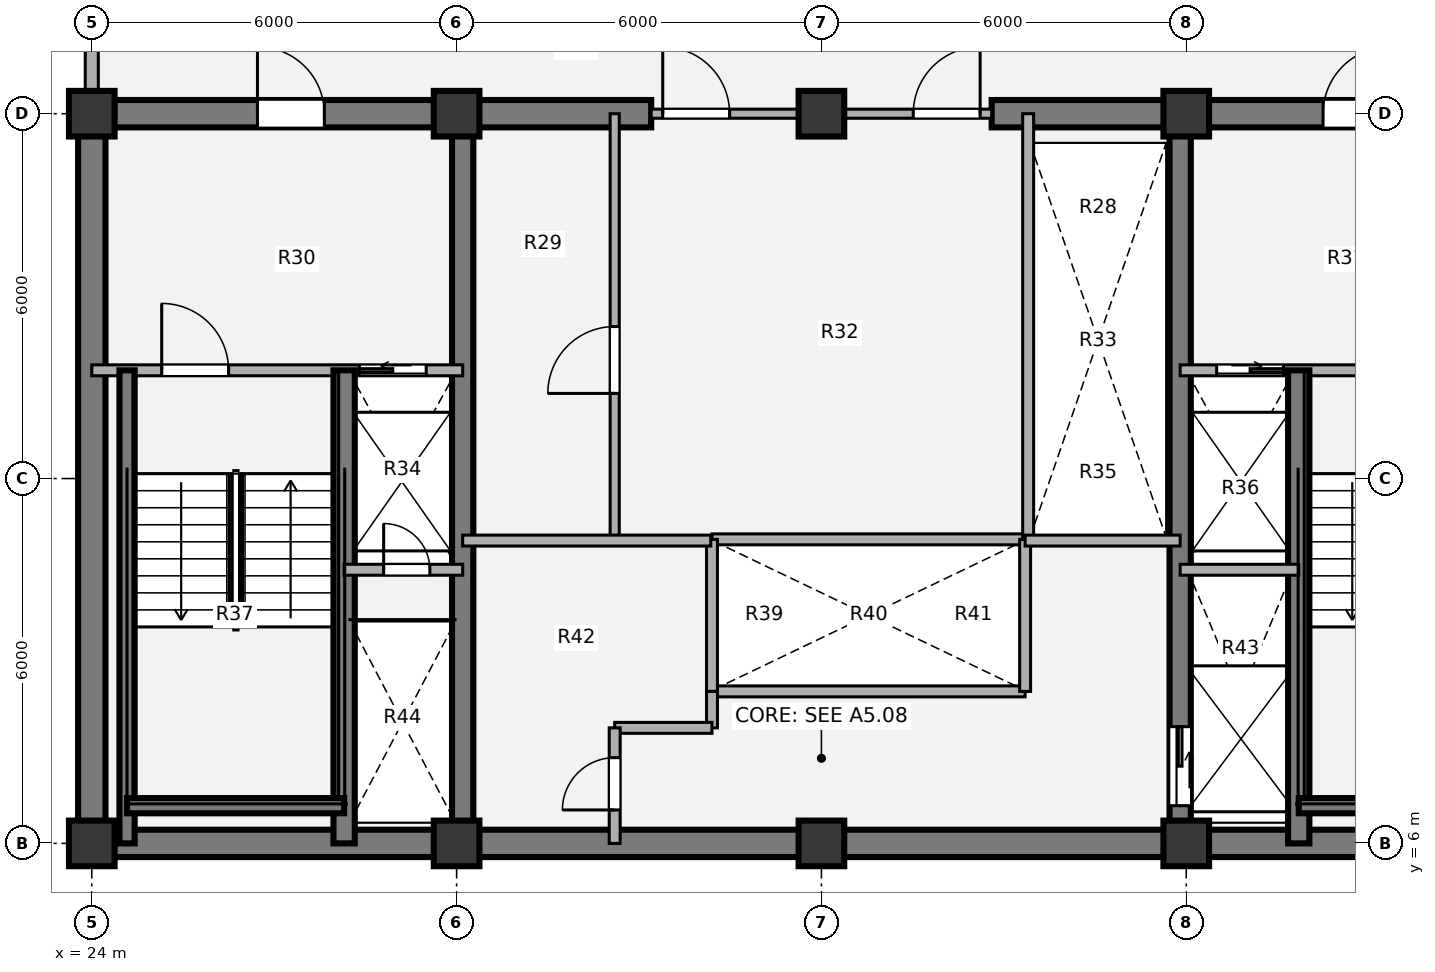
"""IFC4 building model, lengths in metres.
Left out: names, types, materials, properties, quantities, classifications, styles, units other than length and angle.
Written with IfcOpenShell. Run it as: python <this file> out.ifc"""

import sys

from ifc_helpers import new_model, si_unit, direction, frame, frame_2d, origin, origin_2d, place, context, subcontext, project, spatial, rectangle, extrude, source, transform, mapped, element, fill, save


model = new_model("IFC4")
c1 = context("Model", 3, precision=1e-05, world=origin(), true_north=direction((0.0, 1.0)))
c2 = subcontext(c1, "Body", "Model", "MODEL_VIEW")
j1 = project(units=[si_unit("LENGTHUNIT", "METRE"), si_unit("PLANEANGLEUNIT", "RADIAN")], contexts=[c1])
p1 = place(None, origin())
s1 = spatial("IfcSite", under=j1, at=p1, CompositionType="ELEMENT")
p2 = place(p1, origin())
s2 = spatial("IfcBuilding", under=s1, at=p2, CompositionType="ELEMENT")
p3 = place(p2, frame((0.0, 0.0, 156.42)))
s3 = spatial("IfcBuildingStorey", under=s2, at=p3, CompositionType="ELEMENT", Elevation=156.42)
m1 = source(origin(), c2, "Body", "SweptSolid", [
    extrude(rectangle(XDim=0.75, YDim=0.75, at=origin_2d()), origin(), (0.0, 0.0, 1.0), 3.78),
])
for number, where, z_axis, x_axis in (
    (1, (24.0, 6.0, 0.0), (0.0, 0.0, 1.0), (1.0, 0.0, 0.0)),
    (2, (30.0, 6.0, 0.0), (0.0, 0.0, 1.0), (1.0, 0.0, 0.0)),
    (3, (36.0, 6.0, 0.0), (0.0, 0.0, 1.0), (1.0, 0.0, 0.0)),
    (4, (42.0, 6.0, 0.0), (0.0, 0.0, 1.0), (1.0, 0.0, 0.0)),
    (5, (24.0, 18.0, 0.0), (0.0, 0.0, 1.0), (1.0, 0.0, 0.0)),
    (6, (30.0, 18.0, 0.0), (0.0, 0.0, 1.0), (1.0, 0.0, 0.0)),
    (7, (36.0, 18.0, 0.0), (0.0, 0.0, 1.0), (1.0, 0.0, 0.0)),
    (8, (42.0, 18.0, 0.0), (0.0, 0.0, 1.0), (1.0, 0.0, 0.0)),
):
    element("IfcColumn", number, at=place(p3, frame(where, z_axis=z_axis, x_axis=x_axis)), inside=s3, PredefinedType="COLUMN", context=c2, shape_type="MappedRepresentation", body=[
        mapped(m1, transform((0.0, 0.0, 0.0), x_axis=(1.0, 0.0, 0.0), y_axis=(0.0, 1.0, 0.0), z_axis=(0.0, 0.0, 1.0), scale=1.0)),
    ])
p4 = place(p3, frame((48.225, 6.0, 0.0), z_axis=(0.0, 0.0, 1.0), x_axis=(-1.0, 0.0, 0.0)))
e9 = element("IfcWall", 9, at=p4, inside=s3, PredefinedType="SHEAR", context=c2, shape_type="SweptSolid", body=[
    extrude(rectangle(XDim=24.45, YDim=0.45, at=frame_2d((12.225, 0.0))), origin(), (0.0, 0.0, 1.0), 3.78),
])
p5 = place(p3, frame((24.0, 6.0, 0.0), z_axis=(0.0, 0.0, 1.0), x_axis=(0.0, 1.0, 0.0)))
e10 = element("IfcWall", 10, at=p5, inside=s3, PredefinedType="SHEAR", context=c2, shape_type="SweptSolid", body=[
    extrude(rectangle(XDim=12.0, YDim=0.45, at=frame_2d((6.0, 0.0))), origin(), (0.0, 0.0, 1.0), 3.78),
])
p6 = place(p3, frame((23.775, 18.0, 0.0), z_axis=(0.0, 0.0, 1.0), x_axis=(1.0, 0.0, 0.0)))
e11 = element("IfcWall", 11, at=p6, inside=s3, PredefinedType="SHEAR", context=c2, shape_type="SweptSolid", body=[
    extrude(rectangle(XDim=9.425, YDim=0.45, at=frame_2d((4.712, 0.0))), origin(), (0.0, 0.0, 1.0), 3.78),
])
p7 = place(p6, frame((2.95, 0.0, 0.0)))
e12 = element("IfcOpeningElement", 12, at=p7, cuts=e11, PredefinedType="OPENING", context=c2, shape_type="SweptSolid", body=[
    extrude(rectangle(XDim=1.1, YDim=2.1, at=origin_2d()), frame((0.55, 0.235, 1.05), z_axis=(0.0, -1.0, 0.0), x_axis=(1.0, 0.0, 0.0)), (0.0, 0.0, 1.0), 0.47),
])
p8 = place(p3, frame((38.8, 18.0, 0.0), z_axis=(0.0, 0.0, 1.0), x_axis=(1.0, 0.0, 0.0)))
e13 = element("IfcWall", 13, at=p8, inside=s3, PredefinedType="SHEAR", context=c2, shape_type="SweptSolid", body=[
    extrude(rectangle(XDim=9.425, YDim=0.45, at=frame_2d((4.712, 0.0))), origin(), (0.0, 0.0, 1.0), 3.78),
])
p9 = place(p8, frame((5.45, 0.0, 0.0)))
e14 = element("IfcOpeningElement", 14, at=p9, cuts=e13, PredefinedType="OPENING", context=c2, shape_type="SweptSolid", body=[
    extrude(rectangle(XDim=1.1, YDim=2.1, at=origin_2d()), frame((0.55, 0.235, 1.05), z_axis=(0.0, -1.0, 0.0), x_axis=(1.0, 0.0, 0.0)), (0.0, 0.0, 1.0), 0.47),
])
p10 = place(p3, frame((30.1, 6.0, 0.0), z_axis=(0.0, 0.0, 1.0), x_axis=(0.0, 1.0, 0.0)))
e15 = element("IfcWall", 15, at=p10, inside=s3, PredefinedType="SHEAR", context=c2, shape_type="SweptSolid", body=[
    extrude(rectangle(XDim=12.0, YDim=0.35, at=frame_2d((6.0, 0.0))), origin(), (0.0, 0.0, 1.0), 3.78),
])
p11 = place(p3, frame((41.9, 18.0, 0.0), z_axis=(0.0, 0.0, 1.0), x_axis=(0.0, -1.0, 0.0)))
e16 = element("IfcWall", 16, at=p11, inside=s3, PredefinedType="SHEAR", context=c2, shape_type="SweptSolid", body=[
    extrude(rectangle(XDim=12.0, YDim=0.35, at=frame_2d((6.0, 0.0))), origin(), (0.0, 0.0, 1.0), 3.78),
])
p12 = place(p11, frame((10.08, 0.0, 0.0)))
e17 = element("IfcOpeningElement", 17, at=p12, cuts=e16, PredefinedType="OPENING", context=c2, shape_type="SweptSolid", body=[
    extrude(rectangle(XDim=1.3, YDim=2.1, at=origin_2d()), frame((0.65, 0.185, 1.05), z_axis=(0.0, -1.0, 0.0), x_axis=(1.0, 0.0, 0.0)), (0.0, 0.0, 1.0), 0.37),
])
p13 = place(p3, frame((24.0, 18.355, 0.0), z_axis=(0.0, 0.0, 1.0), x_axis=(0.0, 1.0, 0.0)))
e18 = element("IfcWall", 18, at=p13, inside=s3, PredefinedType="SOLIDWALL", context=c2, shape_type="SweptSolid", body=[
    extrude(rectangle(XDim=2.695, YDim=0.215, at=frame_2d((1.348, 0.0))), origin(), (0.0, 0.0, 1.0), 2.718),
])
p14 = place(p3, frame((32.6, 11.0, 0.0), z_axis=(0.0, 0.0, 1.0), x_axis=(0.0, 1.0, 0.0)))
e19 = element("IfcWall", 19, at=p14, inside=s3, PredefinedType="PARTITIONING", context=c2, shape_type="SweptSolid", body=[
    extrude(rectangle(XDim=7.0, YDim=0.15, at=frame_2d((3.5, 0.0))), origin(), (0.0, 0.0, 1.0), 3.5),
])
p15 = place(p14, frame((2.4, 0.0, 0.0)))
e20 = element("IfcOpeningElement", 20, at=p15, cuts=e19, PredefinedType="OPENING", context=c2, shape_type="SweptSolid", body=[
    extrude(rectangle(XDim=1.1, YDim=2.1, at=origin_2d()), frame((0.55, 0.085, 1.05), z_axis=(0.0, -1.0, 0.0), x_axis=(1.0, 0.0, 0.0)), (0.0, 0.0, 1.0), 0.17),
])
for number, where, z_axis, x_axis in (
    (21, (34.2, 11.0, 0.0), (0.0, 0.0, 1.0), (1.0, 0.0, 0.0)),
    (22, (34.2, 8.5, 0.0), (0.0, 0.0, 1.0), (1.0, 0.0, 0.0)),
):
    element("IfcWall", number, at=place(p3, frame(where, z_axis=z_axis, x_axis=x_axis)), inside=s3, PredefinedType="PARTITIONING", context=c2, shape_type="SweptSolid", body=[
        extrude(rectangle(XDim=5.15, YDim=0.18, at=frame_2d((2.575, 0.0))), origin(), (0.0, 0.0, 1.0), 3.5),
    ])
for number, where, z_axis, x_axis in (
    (23, (34.2, 8.5, 0.0), (0.0, 0.0, 1.0), (0.0, 1.0, 0.0)),
    (24, (39.35, 8.5, 0.0), (0.0, 0.0, 1.0), (0.0, 1.0, 0.0)),
):
    element("IfcWall", number, at=place(p3, frame(where, z_axis=z_axis, x_axis=x_axis)), inside=s3, PredefinedType="PARTITIONING", context=c2, shape_type="SweptSolid", body=[
        extrude(rectangle(XDim=2.5, YDim=0.18, at=frame_2d((1.25, 0.0))), origin(), (0.0, 0.0, 1.0), 3.5),
    ])
p16 = place(p3, frame((39.4, 11.0, 0.0), z_axis=(0.0, 0.0, 1.0), x_axis=(0.0, 1.0, 0.0)))
e25 = element("IfcWall", 25, at=p16, inside=s3, PredefinedType="PARTITIONING", context=c2, shape_type="SweptSolid", body=[
    extrude(rectangle(XDim=7.0, YDim=0.18, at=frame_2d((3.5, 0.0))), origin(), (0.0, 0.0, 1.0), 3.5),
])
p17 = place(p3, frame((30.1, 10.98, 0.0), z_axis=(0.0, 0.0, 1.0), x_axis=(1.0, 0.0, 0.0)))
e26 = element("IfcWall", 26, at=p17, inside=s3, PredefinedType="PARTITIONING", context=c2, shape_type="SweptSolid", body=[
    extrude(rectangle(XDim=4.08, YDim=0.18, at=frame_2d((2.04, 0.0))), origin(), (0.0, 0.0, 1.0), 3.5),
])
p18 = place(p3, frame((34.2, 7.9, 0.0), z_axis=(0.0, 0.0, 1.0), x_axis=(0.0, 1.0, 0.0)))
e27 = element("IfcWall", 27, at=p18, inside=s3, PredefinedType="PARTITIONING", context=c2, shape_type="SweptSolid", body=[
    extrude(rectangle(XDim=0.6, YDim=0.18, at=frame_2d((0.3, 0.0))), origin(), (0.0, 0.0, 1.0), 3.5),
])
p19 = place(p3, frame((32.6, 7.9, 0.0), z_axis=(0.0, 0.0, 1.0), x_axis=(1.0, 0.0, 0.0)))
e28 = element("IfcWall", 28, at=p19, inside=s3, PredefinedType="PARTITIONING", context=c2, shape_type="SweptSolid", body=[
    extrude(rectangle(XDim=1.6, YDim=0.18, at=frame_2d((0.8, 0.0))), origin(), (0.0, 0.0, 1.0), 3.5),
])
p20 = place(p3, frame((32.6, 6.0, 0.0), z_axis=(0.0, 0.0, 1.0), x_axis=(0.0, 1.0, 0.0)))
e29 = element("IfcWall", 29, at=p20, inside=s3, PredefinedType="PARTITIONING", context=c2, shape_type="SweptSolid", body=[
    extrude(rectangle(XDim=1.9, YDim=0.18, at=frame_2d((0.95, 0.0))), origin(), (0.0, 0.0, 1.0), 3.5),
])
p21 = place(p20, frame((0.55, 0.0, 0.0)))
e30 = element("IfcOpeningElement", 30, at=p21, cuts=e29, PredefinedType="OPENING", context=c2, shape_type="SweptSolid", body=[
    extrude(rectangle(XDim=0.86, YDim=2.1, at=origin_2d()), frame((0.43, 0.1, 1.05), z_axis=(0.0, -1.0, 0.0), x_axis=(1.0, 0.0, 0.0)), (0.0, 0.0, 1.0), 0.2),
])
p22 = place(p3, frame((39.35, 10.98, 0.0), z_axis=(0.0, 0.0, 1.0), x_axis=(1.0, 0.0, 0.0)))
e31 = element("IfcWall", 31, at=p22, inside=s3, PredefinedType="PARTITIONING", context=c2, shape_type="SweptSolid", body=[
    extrude(rectangle(XDim=2.55, YDim=0.18, at=frame_2d((1.275, 0.0))), origin(), (0.0, 0.0, 1.0), 3.5),
])
p23 = place(p3, frame((33.2, 18.0, 0.0), z_axis=(0.0, 0.0, 1.0), x_axis=(1.0, 0.0, 0.0)))
e32 = element("IfcWall", 32, at=p23, inside=s3, PredefinedType="PARTITIONING", context=c2, shape_type="SweptSolid", body=[
    extrude(rectangle(XDim=5.6, YDim=0.15, at=frame_2d((2.8, 0.0))), origin(), (0.0, 0.0, 1.0), 2.515),
])
p24 = place(p23, frame((0.19, 0.0, 0.0)))
e33 = element("IfcOpeningElement", 33, at=p24, cuts=e32, PredefinedType="OPENING", context=c2, shape_type="SweptSolid", body=[
    extrude(rectangle(XDim=1.1, YDim=2.1, at=origin_2d()), frame((0.55, 0.085, 1.05), z_axis=(0.0, -1.0, 0.0), x_axis=(1.0, 0.0, 0.0)), (0.0, 0.0, 1.0), 0.17),
])
p25 = place(p23, frame((4.31, 0.0, 0.0)))
e34 = element("IfcOpeningElement", 34, at=p25, cuts=e32, PredefinedType="OPENING", context=c2, shape_type="SweptSolid", body=[
    extrude(rectangle(XDim=1.1, YDim=2.1, at=origin_2d()), frame((0.55, 0.085, 1.05), z_axis=(0.0, -1.0, 0.0), x_axis=(1.0, 0.0, 0.0)), (0.0, 0.0, 1.0), 0.17),
])
p26 = place(p3, frame((24.0, 13.78, 0.0), z_axis=(0.0, 0.0, 1.0), x_axis=(1.0, 0.0, 0.0)))
e35 = element("IfcWall", 35, at=p26, inside=s3, PredefinedType="PARTITIONING", context=c2, shape_type="SweptSolid", body=[
    extrude(rectangle(XDim=6.1, YDim=0.18, at=frame_2d((3.05, 0.0))), origin(), (0.0, 0.0, 1.0), 3.5),
])
p27 = place(p26, frame((1.15, 0.0, 0.0)))
e36 = element("IfcOpeningElement", 36, at=p27, cuts=e35, PredefinedType="OPENING", context=c2, shape_type="SweptSolid", body=[
    extrude(rectangle(XDim=1.1, YDim=2.1, at=origin_2d()), frame((0.55, 0.1, 1.05), z_axis=(0.0, -1.0, 0.0), x_axis=(1.0, 0.0, 0.0)), (0.0, 0.0, 1.0), 0.2),
])
p28 = place(p26, frame((4.4, 0.0, 0.0)))
e37 = element("IfcOpeningElement", 37, at=p28, cuts=e35, PredefinedType="OPENING", context=c2, shape_type="SweptSolid", body=[
    extrude(rectangle(XDim=1.1, YDim=2.1, at=origin_2d()), frame((0.55, 0.1, 1.05), z_axis=(0.0, -1.0, 0.0), x_axis=(1.0, 0.0, 0.0)), (0.0, 0.0, 1.0), 0.2),
])
p29 = place(p3, frame((28.15, 6.0, 0.0), z_axis=(0.0, 0.0, 1.0), x_axis=(0.0, 1.0, 0.0)))
e38 = element("IfcWall", 38, at=p29, inside=s3, PredefinedType="SHEAR", context=c2, shape_type="SweptSolid", body=[
    extrude(rectangle(XDim=7.78, YDim=0.35, at=frame_2d((3.89, 0.0))), origin(), (0.0, 0.0, 1.0), 3.85),
])
p30 = place(p3, frame((24.58, 6.0, 0.0), z_axis=(0.0, 0.0, 1.0), x_axis=(0.0, 1.0, 0.0)))
e39 = element("IfcWall", 39, at=p30, inside=s3, PredefinedType="SHEAR", context=c2, shape_type="SweptSolid", body=[
    extrude(rectangle(XDim=7.78, YDim=0.25, at=frame_2d((3.89, 0.0))), origin(), (0.0, 0.0, 1.0), 3.85),
])
p31 = place(p3, frame((24.58, 6.62, 0.0), z_axis=(0.0, 0.0, 1.0), x_axis=(1.0, 0.0, 0.0)))
e40 = element("IfcWall", 40, at=p31, inside=s3, PredefinedType="SHEAR", context=c2, shape_type="SweptSolid", body=[
    extrude(rectangle(XDim=3.57, YDim=0.25, at=frame_2d((1.785, 0.0))), origin(), (0.0, 0.0, 1.0), 3.85),
])
p32 = place(p3, frame((28.15, 10.5, 0.0), z_axis=(0.0, 0.0, 1.0), x_axis=(1.0, 0.0, 0.0)))
e41 = element("IfcWall", 41, at=p32, inside=s3, PredefinedType="PARTITIONING", context=c2, shape_type="SweptSolid", body=[
    extrude(rectangle(XDim=1.95, YDim=0.18, at=frame_2d((0.975, 0.0))), origin(), (0.0, 0.0, 1.0), 3.5),
])
p33 = place(p32, frame((0.65, 0.0, 0.0)))
e42 = element("IfcOpeningElement", 42, at=p33, cuts=e41, PredefinedType="OPENING", context=c2, shape_type="SweptSolid", body=[
    extrude(rectangle(XDim=0.76, YDim=2.05, at=origin_2d()), frame((0.38, 0.1, 1.025), z_axis=(0.0, -1.0, 0.0), x_axis=(1.0, 0.0, 0.0)), (0.0, 0.0, 1.0), 0.2),
])
p34 = place(p3, frame((41.9, 13.78, 0.0), z_axis=(0.0, 0.0, 1.0), x_axis=(1.0, 0.0, 0.0)))
e43 = element("IfcWall", 43, at=p34, inside=s3, PredefinedType="PARTITIONING", context=c2, shape_type="SweptSolid", body=[
    extrude(rectangle(XDim=6.1, YDim=0.18, at=frame_2d((3.05, 0.0))), origin(), (0.0, 0.0, 1.0), 3.5),
])
p35 = place(p34, frame((0.6, 0.0, 0.0)))
e44 = element("IfcOpeningElement", 44, at=p35, cuts=e43, PredefinedType="OPENING", context=c2, shape_type="SweptSolid", body=[
    extrude(rectangle(XDim=1.1, YDim=2.1, at=origin_2d()), frame((0.55, 0.1, 1.05), z_axis=(0.0, -1.0, 0.0), x_axis=(1.0, 0.0, 0.0)), (0.0, 0.0, 1.0), 0.2),
])
p36 = place(p34, frame((3.8, 0.0, 0.0)))
e45 = element("IfcOpeningElement", 45, at=p36, cuts=e43, PredefinedType="OPENING", context=c2, shape_type="SweptSolid", body=[
    extrude(rectangle(XDim=1.1, YDim=2.1, at=origin_2d()), frame((0.55, 0.1, 1.05), z_axis=(0.0, -1.0, 0.0), x_axis=(1.0, 0.0, 0.0)), (0.0, 0.0, 1.0), 0.2),
])
p37 = place(p3, frame((43.85, 6.0, 0.0), z_axis=(0.0, 0.0, 1.0), x_axis=(0.0, 1.0, 0.0)))
e46 = element("IfcWall", 46, at=p37, inside=s3, PredefinedType="SHEAR", context=c2, shape_type="SweptSolid", body=[
    extrude(rectangle(XDim=7.78, YDim=0.35, at=frame_2d((3.89, 0.0))), origin(), (0.0, 0.0, 1.0), 3.85),
])
p38 = place(p3, frame((43.85, 6.62, 0.0), z_axis=(0.0, 0.0, 1.0), x_axis=(1.0, 0.0, 0.0)))
e47 = element("IfcWall", 47, at=p38, inside=s3, PredefinedType="SHEAR", context=c2, shape_type="SweptSolid", body=[
    extrude(rectangle(XDim=3.57, YDim=0.25, at=frame_2d((1.785, 0.0))), origin(), (0.0, 0.0, 1.0), 3.85),
])
p39 = place(p3, frame((41.9, 10.5, 0.0), z_axis=(0.0, 0.0, 1.0), x_axis=(1.0, 0.0, 0.0)))
e48 = element("IfcWall", 48, at=p39, inside=s3, PredefinedType="PARTITIONING", context=c2, shape_type="SweptSolid", body=[
    extrude(rectangle(XDim=1.95, YDim=0.18, at=frame_2d((0.975, 0.0))), origin(), (0.0, 0.0, 1.0), 3.5),
])
m2 = source(origin(), c2, "Body", "SweptSolid", [
    extrude(rectangle(XDim=1.1, YDim=2.1, at=origin_2d()), frame((0.55, 0.025, 1.05), z_axis=(0.0, -1.0, 0.0), x_axis=(1.0, 0.0, 0.0)), (0.0, 0.0, 1.0), 0.05),
])
p40 = place(p15, origin())
e49 = element("IfcDoor", 49, at=p40, inside=s3, OperationType="SINGLE_SWING_LEFT", PredefinedType="DOOR", context=c2, shape_type="MappedRepresentation", body=[
    mapped(m2, transform((0.0, 0.0, 0.0), x_axis=(1.0, 0.0, 0.0), y_axis=(0.0, 1.0, 0.0), z_axis=(0.0, 0.0, 1.0), scale=1.0)),
])
fill(e20, e49)
m3 = source(origin(), c2, "Body", "SweptSolid", [
    extrude(rectangle(XDim=0.86, YDim=2.1, at=origin_2d()), frame((0.43, 0.025, 1.05), z_axis=(0.0, -1.0, 0.0), x_axis=(1.0, 0.0, 0.0)), (0.0, 0.0, 1.0), 0.05),
])
p41 = place(p21, origin())
e50 = element("IfcDoor", 50, at=p41, inside=s3, OperationType="SINGLE_SWING_LEFT", PredefinedType="DOOR", context=c2, shape_type="MappedRepresentation", body=[
    mapped(m3, transform((0.0, 0.0, 0.0), x_axis=(1.0, 0.0, 0.0), y_axis=(0.0, 1.0, 0.0), z_axis=(0.0, 0.0, 1.0), scale=1.0)),
])
fill(e30, e50)
m4 = source(origin(), c2, "Body", "SweptSolid", [
    extrude(rectangle(XDim=1.1, YDim=2.1, at=origin_2d()), frame((0.55, 0.025, 1.05), z_axis=(0.0, -1.0, 0.0), x_axis=(1.0, 0.0, 0.0)), (0.0, 0.0, 1.0), 0.05),
])
p42 = place(p24, origin())
e51 = element("IfcDoor", 51, at=p42, inside=s3, OperationType="SINGLE_SWING_LEFT", PredefinedType="DOOR", context=c2, shape_type="MappedRepresentation", body=[
    mapped(m4, transform((0.0, 0.0, 0.0), x_axis=(1.0, 0.0, 0.0), y_axis=(0.0, 1.0, 0.0), z_axis=(0.0, 0.0, 1.0), scale=1.0)),
])
fill(e33, e51)
p43 = place(p25, origin())
e52 = element("IfcDoor", 52, at=p43, inside=s3, OperationType="SINGLE_SWING_RIGHT", PredefinedType="DOOR", context=c2, shape_type="MappedRepresentation", body=[
    mapped(m4, transform((0.0, 0.0, 0.0), x_axis=(1.0, 0.0, 0.0), y_axis=(0.0, 1.0, 0.0), z_axis=(0.0, 0.0, 1.0), scale=1.0)),
])
fill(e34, e52)
m5 = source(origin(), c2, "Body", "SweptSolid", [
    extrude(rectangle(XDim=1.1, YDim=2.1, at=origin_2d()), frame((0.55, 0.025, 1.05), z_axis=(0.0, -1.0, 0.0), x_axis=(1.0, 0.0, 0.0)), (0.0, 0.0, 1.0), 0.05),
])
p44 = place(p27, origin())
e53 = element("IfcDoor", 53, at=p44, inside=s3, OperationType="SINGLE_SWING_LEFT", PredefinedType="DOOR", context=c2, shape_type="MappedRepresentation", body=[
    mapped(m5, transform((0.0, 0.0, 0.0), x_axis=(1.0, 0.0, 0.0), y_axis=(0.0, 1.0, 0.0), z_axis=(0.0, 0.0, 1.0), scale=1.0)),
])
fill(e36, e53)
m6 = source(origin(), c2, "Body", "SweptSolid", [
    extrude(rectangle(XDim=1.1, YDim=2.1, at=origin_2d()), frame((0.55, 0.025, 1.05), z_axis=(0.0, -1.0, 0.0), x_axis=(1.0, 0.0, 0.0)), (0.0, 0.0, 1.0), 0.05),
])
p45 = place(p28, origin())
e54 = element("IfcDoor", 54, at=p45, inside=s3, OperationType="SLIDING_TO_LEFT", PredefinedType="DOOR", context=c2, shape_type="MappedRepresentation", body=[
    mapped(m6, transform((0.0, 0.0, 0.0), x_axis=(1.0, 0.0, 0.0), y_axis=(0.0, 1.0, 0.0), z_axis=(0.0, 0.0, 1.0), scale=1.0)),
])
fill(e37, e54)
m7 = source(origin(), c2, "Body", "SweptSolid", [
    extrude(rectangle(XDim=0.76, YDim=2.05, at=origin_2d()), frame((0.38, 0.025, 1.025), z_axis=(0.0, -1.0, 0.0), x_axis=(1.0, 0.0, 0.0)), (0.0, 0.0, 1.0), 0.05),
])
p46 = place(p33, origin())
e55 = element("IfcDoor", 55, at=p46, inside=s3, OperationType="SINGLE_SWING_LEFT", PredefinedType="DOOR", context=c2, shape_type="MappedRepresentation", body=[
    mapped(m7, transform((0.0, 0.0, 0.0), x_axis=(1.0, 0.0, 0.0), y_axis=(0.0, 1.0, 0.0), z_axis=(0.0, 0.0, 1.0), scale=1.0)),
])
fill(e42, e55)
p47 = place(p35, origin())
e56 = element("IfcDoor", 56, at=p47, inside=s3, OperationType="SLIDING_TO_RIGHT", PredefinedType="DOOR", context=c2, shape_type="MappedRepresentation", body=[
    mapped(m6, transform((0.0, 0.0, 0.0), x_axis=(1.0, 0.0, 0.0), y_axis=(0.0, 1.0, 0.0), z_axis=(0.0, 0.0, 1.0), scale=1.0)),
])
fill(e44, e56)
m8 = source(origin(), c2, "Body", "SweptSolid", [
    extrude(rectangle(XDim=1.3, YDim=2.1, at=origin_2d()), frame((0.65, 0.025, 1.05), z_axis=(0.0, -1.0, 0.0), x_axis=(1.0, 0.0, 0.0)), (0.0, 0.0, 1.0), 0.05),
])
p48 = place(p12, origin())
e57 = element("IfcDoor", 57, at=p48, inside=s3, OperationType="SLIDING_TO_LEFT", PredefinedType="DOOR", context=c2, shape_type="MappedRepresentation", body=[
    mapped(m8, transform((0.0, 0.0, 0.0), x_axis=(1.0, 0.0, 0.0), y_axis=(0.0, 1.0, 0.0), z_axis=(0.0, 0.0, 1.0), scale=1.0)),
])
fill(e17, e57)
p49 = place(p7, origin())
e58 = element("IfcDoor", 58, at=p49, inside=s3, OperationType="SINGLE_SWING_LEFT", PredefinedType="DOOR", context=c2, shape_type="MappedRepresentation", body=[
    mapped(m4, transform((0.0, 0.0, 0.0), x_axis=(1.0, 0.0, 0.0), y_axis=(0.0, 1.0, 0.0), z_axis=(0.0, 0.0, 1.0), scale=1.0)),
])
fill(e12, e58)
p50 = place(p9, origin())
e59 = element("IfcDoor", 59, at=p50, inside=s3, OperationType="SINGLE_SWING_RIGHT", PredefinedType="DOOR", context=c2, shape_type="MappedRepresentation", body=[
    mapped(m4, transform((0.0, 0.0, 0.0), x_axis=(1.0, 0.0, 0.0), y_axis=(0.0, 1.0, 0.0), z_axis=(0.0, 0.0, 1.0), scale=1.0)),
])
fill(e14, e59)
save(model, sys.argv[1])
